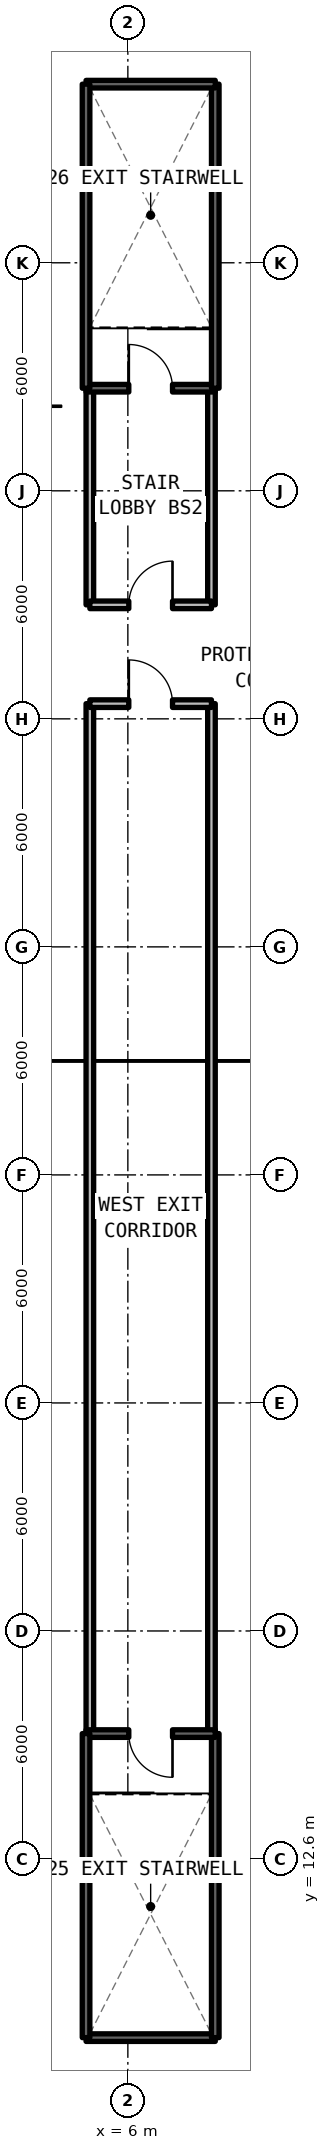
"""IFC4 building model, lengths in metres.
Left out: names, types, materials, properties, quantities, classifications, styles, units other than length and angle.
Written with IfcOpenShell. Run it as: python <this file> out.ifc"""

import sys

from ifc_helpers import new_model, si_unit, direction, frame, frame_2d, origin, place, context, subcontext, project, spatial, rectangle, extrude, element, fill, save


model = new_model("IFC4")
c1 = context("Model", 3, precision=1e-05, world=origin(), true_north=direction((0.0, 1.0)))
c2 = subcontext(c1, "Body", "Model", "MODEL_VIEW")
j1 = project(units=[si_unit("LENGTHUNIT", "METRE"), si_unit("PLANEANGLEUNIT", "RADIAN")], contexts=[c1])
p1 = place(None, origin())
s1 = spatial("IfcSite", under=j1, at=p1, CompositionType="ELEMENT")
p2 = place(p1, origin())
s2 = spatial("IfcBuilding", under=s1, at=p2, CompositionType="ELEMENT")
p3 = place(p2, origin())
s3 = spatial("IfcBuildingStorey", under=s2, at=p3, CompositionType="ELEMENT", Elevation=0.0)
for number, where, z_axis, x_axis in (
    (1, (5.0, 45.6, 0.0), (0.0, 0.0, 1.0), (0.0, 1.0, 0.0)),
    (2, (8.2, 45.6, 0.0), (0.0, 0.0, 1.0), (0.0, 1.0, 0.0)),
):
    element("IfcWall", number, at=place(p3, frame(where, z_axis=z_axis, x_axis=x_axis)), inside=s3, PredefinedType="SOLIDWALL", context=c2, shape_type="SweptSolid", body=[
        extrude(rectangle(XDim=5.7, YDim=0.2, at=frame_2d((2.85, 0.0))), origin(), (0.0, 0.0, 1.0), 3.89),
    ])
p4 = place(p3, frame((5.0, 45.6, 0.0), z_axis=(0.0, 0.0, 1.0), x_axis=(1.0, 0.0, 0.0)))
e3 = element("IfcWall", 3, at=p4, inside=s3, PredefinedType="SOLIDWALL", context=c2, shape_type="SweptSolid", body=[
    extrude(rectangle(XDim=3.2, YDim=0.2, at=frame_2d((1.6, 0.0))), origin(), (0.0, 0.0, 1.0), 3.89),
])
p5 = place(p4, frame((1.025, 0.0, 0.0)))
e4 = element("IfcOpeningElement", 4, at=p5, cuts=e3, PredefinedType="OPENING", context=c2, shape_type="SweptSolid", body=[
    extrude(rectangle(XDim=1.15, YDim=2.15, at=frame_2d((0.575, 1.075))), frame((0.0, 0.11, 0.0), z_axis=(0.0, -1.0, 0.0), x_axis=(1.0, 0.0, 0.0)), (0.0, 0.0, 1.0), 0.22),
])
for number, where, z_axis, x_axis in (
    (5, (5.0, 15.9, 0.0), (0.0, 0.0, 1.0), (0.0, 1.0, 0.0)),
    (6, (8.2, 15.9, 0.0), (0.0, 0.0, 1.0), (0.0, 1.0, 0.0)),
):
    element("IfcWall", number, at=place(p3, frame(where, z_axis=z_axis, x_axis=x_axis)), inside=s3, PredefinedType="SOLIDWALL", context=c2, shape_type="SweptSolid", body=[
        extrude(rectangle(XDim=27.1, YDim=0.2, at=frame_2d((13.55, 0.0))), origin(), (0.0, 0.0, 1.0), 3.89),
    ])
p6 = place(p3, frame((5.0, 43.0, 0.0), z_axis=(0.0, 0.0, 1.0), x_axis=(1.0, 0.0, 0.0)))
e7 = element("IfcWall", 7, at=p6, inside=s3, PredefinedType="SOLIDWALL", context=c2, shape_type="SweptSolid", body=[
    extrude(rectangle(XDim=3.2, YDim=0.2, at=frame_2d((1.6, 0.0))), origin(), (0.0, 0.0, 1.0), 3.89),
])
p7 = place(p6, frame((1.025, 0.0, 0.0)))
e8 = element("IfcOpeningElement", 8, at=p7, cuts=e7, PredefinedType="OPENING", context=c2, shape_type="SweptSolid", body=[
    extrude(rectangle(XDim=1.15, YDim=2.15, at=frame_2d((0.575, 1.075))), frame((0.0, 0.11, 0.0), z_axis=(0.0, -1.0, 0.0), x_axis=(1.0, 0.0, 0.0)), (0.0, 0.0, 1.0), 0.22),
])
p8 = place(p3, frame((4.9, 7.9, 0.0), z_axis=(0.0, 0.0, 1.0), x_axis=(1.0, 0.0, 0.0)))
e9 = element("IfcWall", 9, at=p8, inside=s3, PredefinedType="SOLIDWALL", context=c2, shape_type="SweptSolid", body=[
    extrude(rectangle(XDim=3.4, YDim=0.2, at=frame_2d((1.7, 0.0))), origin(), (0.0, 0.0, 1.0), 4.95),
])
p9 = place(p3, frame((8.3, 7.9, 0.0), z_axis=(0.0, 0.0, 1.0), x_axis=(0.0, 1.0, 0.0)))
e10 = element("IfcWall", 10, at=p9, inside=s3, PredefinedType="SOLIDWALL", context=c2, shape_type="SweptSolid", body=[
    extrude(rectangle(XDim=8.0, YDim=0.2, at=frame_2d((4.0, 0.0))), origin(), (0.0, 0.0, 1.0), 4.95),
])
p10 = place(p3, frame((8.3, 15.9, 0.0), z_axis=(0.0, 0.0, 1.0), x_axis=(-1.0, 0.0, 0.0)))
e11 = element("IfcWall", 11, at=p10, inside=s3, PredefinedType="SOLIDWALL", context=c2, shape_type="SweptSolid", body=[
    extrude(rectangle(XDim=3.4, YDim=0.2, at=frame_2d((1.7, 0.0))), origin(), (0.0, 0.0, 1.0), 4.95),
])
p11 = place(p10, frame((1.125, 0.0, 0.0)))
e12 = element("IfcOpeningElement", 12, at=p11, cuts=e11, PredefinedType="OPENING", context=c2, shape_type="SweptSolid", body=[
    extrude(rectangle(XDim=1.15, YDim=2.15, at=frame_2d((0.575, 1.075))), frame((0.0, 0.11, 0.0), z_axis=(0.0, -1.0, 0.0), x_axis=(1.0, 0.0, 0.0)), (0.0, 0.0, 1.0), 0.22),
])
p12 = place(p3, frame((4.9, 15.9, 0.0), z_axis=(0.0, 0.0, 1.0), x_axis=(0.0, -1.0, 0.0)))
e13 = element("IfcWall", 13, at=p12, inside=s3, PredefinedType="SOLIDWALL", context=c2, shape_type="SweptSolid", body=[
    extrude(rectangle(XDim=8.0, YDim=0.2, at=frame_2d((4.0, 0.0))), origin(), (0.0, 0.0, 1.0), 4.95),
])
p13 = place(p3, frame((4.9, 51.3, 0.0), z_axis=(0.0, 0.0, 1.0), x_axis=(1.0, 0.0, 0.0)))
e14 = element("IfcWall", 14, at=p13, inside=s3, PredefinedType="SOLIDWALL", context=c2, shape_type="SweptSolid", body=[
    extrude(rectangle(XDim=3.4, YDim=0.2, at=frame_2d((1.7, 0.0))), origin(), (0.0, 0.0, 1.0), 4.95),
])
p14 = place(p13, frame((1.125, 0.0, 0.0)))
e15 = element("IfcOpeningElement", 15, at=p14, cuts=e14, PredefinedType="OPENING", context=c2, shape_type="SweptSolid", body=[
    extrude(rectangle(XDim=1.15, YDim=2.15, at=frame_2d((0.575, 1.075))), frame((0.0, 0.11, 0.0), z_axis=(0.0, -1.0, 0.0), x_axis=(1.0, 0.0, 0.0)), (0.0, 0.0, 1.0), 0.22),
])
p15 = place(p3, frame((8.3, 51.3, 0.0), z_axis=(0.0, 0.0, 1.0), x_axis=(0.0, 1.0, 0.0)))
e16 = element("IfcWall", 16, at=p15, inside=s3, PredefinedType="SOLIDWALL", context=c2, shape_type="SweptSolid", body=[
    extrude(rectangle(XDim=8.0, YDim=0.2, at=frame_2d((4.0, 0.0))), origin(), (0.0, 0.0, 1.0), 4.95),
])
p16 = place(p3, frame((8.3, 59.3, 0.0), z_axis=(0.0, 0.0, 1.0), x_axis=(-1.0, 0.0, 0.0)))
e17 = element("IfcWall", 17, at=p16, inside=s3, PredefinedType="SOLIDWALL", context=c2, shape_type="SweptSolid", body=[
    extrude(rectangle(XDim=3.4, YDim=0.2, at=frame_2d((1.7, 0.0))), origin(), (0.0, 0.0, 1.0), 4.95),
])
p17 = place(p3, frame((4.9, 59.3, 0.0), z_axis=(0.0, 0.0, 1.0), x_axis=(0.0, -1.0, 0.0)))
e18 = element("IfcWall", 18, at=p17, inside=s3, PredefinedType="SOLIDWALL", context=c2, shape_type="SweptSolid", body=[
    extrude(rectangle(XDim=8.0, YDim=0.2, at=frame_2d((4.0, 0.0))), origin(), (0.0, 0.0, 1.0), 4.95),
])
p18 = place(p5, frame((1.15, 0.0, 0.0), z_axis=(0.0, 0.0, 1.0), x_axis=(-1.0, 0.0, 0.0)))
e19 = element("IfcDoor", 19, at=p18, inside=s3, OperationType="SINGLE_SWING_RIGHT", PredefinedType="DOOR", context=c2, shape_type="SweptSolid", body=[
    extrude(rectangle(XDim=1.15, YDim=2.15, at=frame_2d((0.575, 1.075))), frame((0.0, 0.025, 0.0), z_axis=(0.0, -1.0, 0.0), x_axis=(1.0, 0.0, 0.0)), (0.0, 0.0, 1.0), 0.05),
])
fill(e4, e19)
p19 = place(p7, origin())
e20 = element("IfcDoor", 20, at=p19, inside=s3, OperationType="SINGLE_SWING_LEFT", PredefinedType="DOOR", context=c2, shape_type="SweptSolid", body=[
    extrude(rectangle(XDim=1.15, YDim=2.15, at=frame_2d((0.575, 1.075))), frame((0.0, 0.025, 0.0), z_axis=(0.0, -1.0, 0.0), x_axis=(1.0, 0.0, 0.0)), (0.0, 0.0, 1.0), 0.05),
])
fill(e8, e20)
p20 = place(p11, frame((1.15, 0.0, 0.0), z_axis=(0.0, 0.0, 1.0), x_axis=(-1.0, 0.0, 0.0)))
e21 = element("IfcDoor", 21, at=p20, inside=s3, OperationType="SINGLE_SWING_LEFT", PredefinedType="DOOR", context=c2, shape_type="SweptSolid", body=[
    extrude(rectangle(XDim=1.15, YDim=2.15, at=frame_2d((0.575, 1.075))), frame((0.0, 0.025, 0.0), z_axis=(0.0, -1.0, 0.0), x_axis=(1.0, 0.0, 0.0)), (0.0, 0.0, 1.0), 0.05),
])
fill(e12, e21)
p21 = place(p14, frame((1.15, 0.0, 0.0), z_axis=(0.0, 0.0, 1.0), x_axis=(-1.0, 0.0, 0.0)))
e22 = element("IfcDoor", 22, at=p21, inside=s3, OperationType="SINGLE_SWING_RIGHT", PredefinedType="DOOR", context=c2, shape_type="SweptSolid", body=[
    extrude(rectangle(XDim=1.15, YDim=2.15, at=frame_2d((0.575, 1.075))), frame((0.0, 0.025, 0.0), z_axis=(0.0, -1.0, 0.0), x_axis=(1.0, 0.0, 0.0)), (0.0, 0.0, 1.0), 0.05),
])
fill(e15, e22)
save(model, sys.argv[1])
